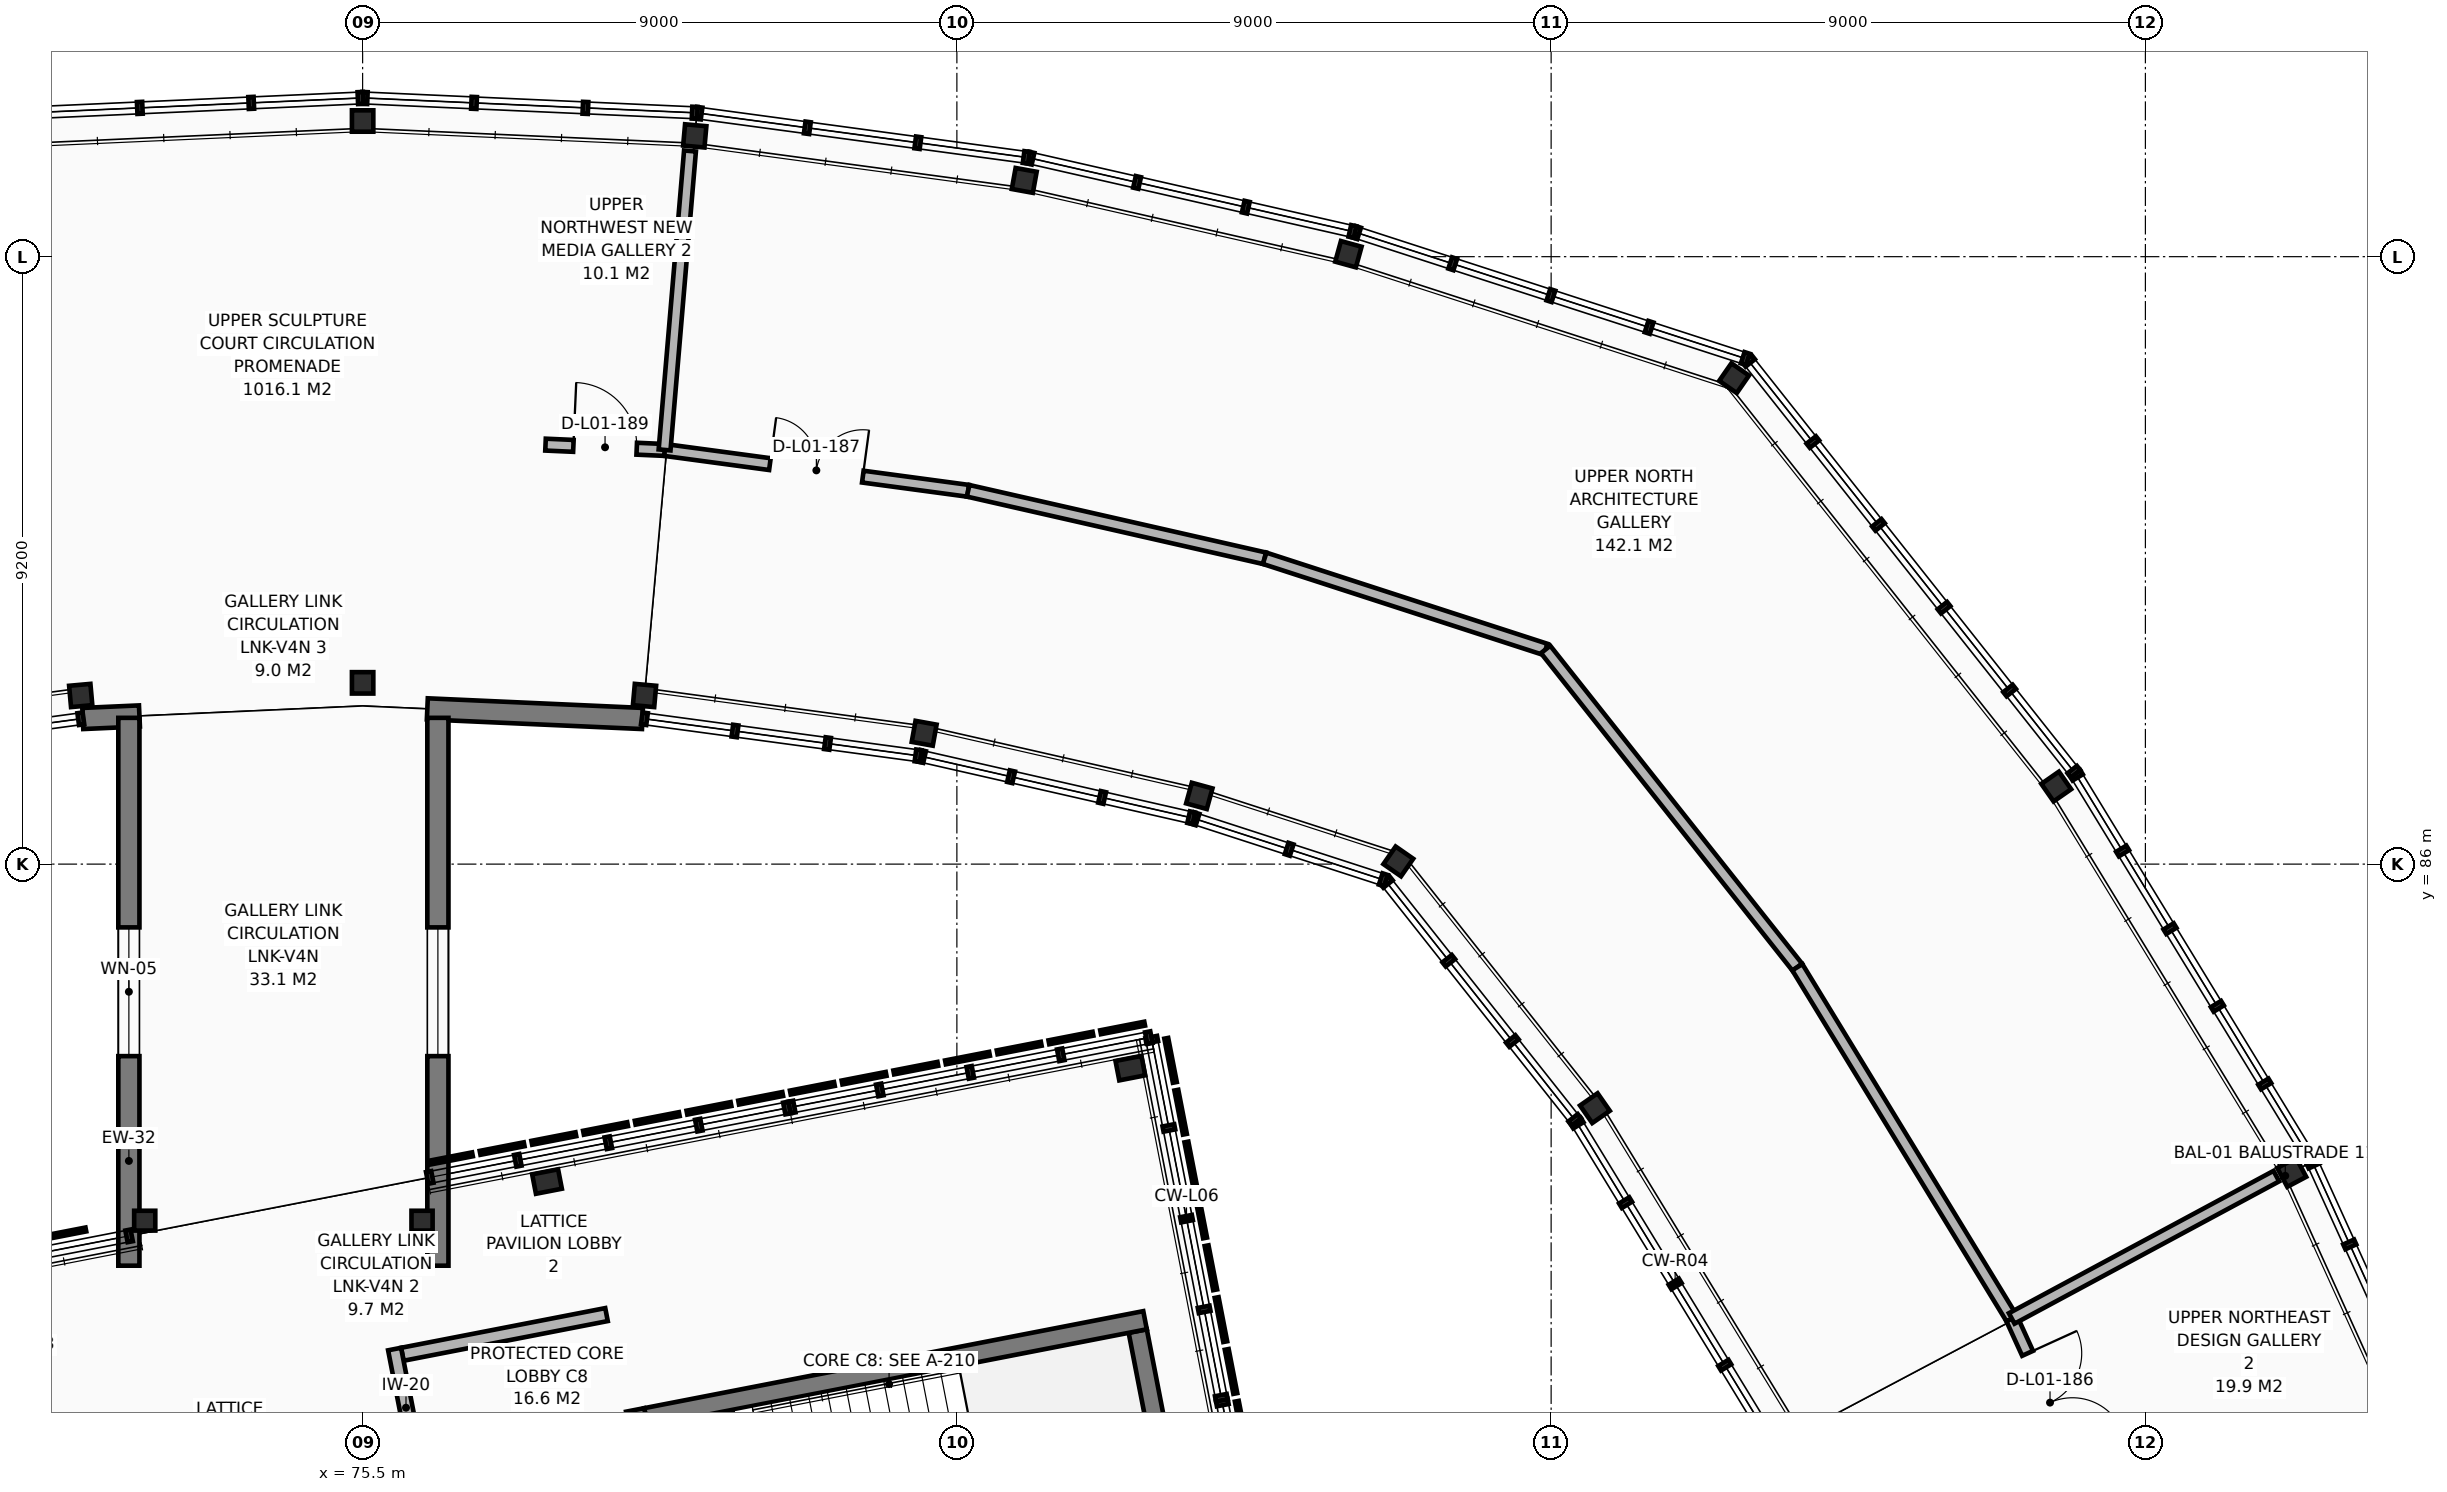
"""IFC4 building model, lengths in metres.
Left out: names, types, materials, properties, quantities, classifications, styles, units other than length and angle.
Written with IfcOpenShell. Run it as: python <this file> out.ifc"""

import sys

from ifc_helpers import new_model, si_unit, direction, frame, frame_2d, origin, origin_2d, place, context, subcontext, project, spatial, rectangle, hollow_circle, i_section, extrude, element, fill, save


model = new_model("IFC4")
c1 = context("Model", 3, precision=1e-05, world=origin(), true_north=direction((0.0, 1.0)))
c2 = subcontext(c1, "Body", "Model", "MODEL_VIEW")
j1 = project(units=[si_unit("LENGTHUNIT", "METRE"), si_unit("PLANEANGLEUNIT", "RADIAN")], contexts=[c1])
p1 = place(None, origin())
s1 = spatial("IfcSite", under=j1, at=p1, CompositionType="ELEMENT")
p2 = place(p1, origin())
s2 = spatial("IfcBuilding", under=s1, at=p2, CompositionType="ELEMENT")
p3 = place(p2, frame((0.0, 0.0, 5.1)))
s3 = spatial("IfcBuildingStorey", under=s2, at=p3, CompositionType="ELEMENT", Elevation=5.1)
for number, where, z_axis, x_axis in (
    (1, (104.716, 81.331, 0.0), (0.0, 0.0, 1.0), (-0.884, -0.468, 0.0)),
    (2, (101.15, 87.175, 0.0), (0.0, 0.0, 1.0), (-0.82, -0.572, 0.0)),
    (3, (94.163, 82.304, 0.0), (0.0, 0.0, 1.0), (-0.82, -0.572, 0.0)),
    (4, (96.271, 93.36, 0.0), (0.0, 0.0, 1.0), (-0.571, -0.821, 0.0)),
    (5, (91.186, 86.041, 0.0), (0.0, 0.0, 1.0), (-0.571, -0.821, 0.0)),
    (6, (90.43, 95.237, 0.0), (0.0, 0.0, 1.0), (-0.265, -0.964, 0.0)),
    (7, (88.171, 87.033, 0.0), (0.0, 0.0, 1.0), (-0.265, -0.964, 0.0)),
    (8, (85.52, 96.355, 0.0), (0.0, 0.0, 1.0), (-0.178, -0.984, 0.0)),
    (9, (84.004, 87.982, 0.0), (0.0, 0.0, 1.0), (-0.178, -0.984, 0.0)),
    (10, (80.53, 97.029, 0.0), (0.0, 0.0, 1.0), (-0.089, -0.996, 0.0)),
    (11, (79.769, 88.554, 0.0), (0.0, 0.0, 1.0), (-0.089, -0.996, 0.0)),
    (12, (75.5, 97.255, 0.0), (0.0, 0.0, 1.0), (0.0, -1.0, 0.0)),
    (13, (75.5, 88.745, 0.0), (0.0, 0.0, 1.0), (0.0, -1.0, 0.0)),
    (14, (71.231, 88.554, 0.0), (0.0, 0.0, 1.0), (0.089, -0.996, 0.0)),
):
    element("IfcColumn", number, at=place(p3, frame(where, z_axis=z_axis, x_axis=x_axis)), inside=s3, PredefinedType="COLUMN", context=c2, shape_type="SweptSolid", body=[
        extrude(hollow_circle(Radius=0.162, WallThickness=0.016, at=origin_2d()), origin(), (0.0, 0.0, 1.0), 4.42),
    ])
for number, where, z_axis, x_axis in (
    (15, (78.293, 81.193, 0.0), (0.0, 0.0, 1.0), (0.982, 0.191, 0.0)),
    (16, (87.127, 82.91, 0.0), (0.0, 0.0, 1.0), (0.982, 0.191, 0.0)),
):
    element("IfcColumn", number, at=place(p3, frame(where, z_axis=z_axis, x_axis=x_axis)), inside=s3, PredefinedType="COLUMN", context=c2, shape_type="SweptSolid", body=[
        extrude(i_section(OverallWidth=0.3, OverallDepth=0.4, WebThickness=0.013, FlangeThickness=0.024, FilletRadius=0.027, at=origin_2d()), origin(), (0.0, 0.0, 1.0), 4.42),
    ])
for number, where, z_axis, x_axis in (
    (17, (72.2, 80.6, 0.0), (0.0, 0.0, 1.0), (1.0, 0.0, 0.0)),
    (18, (76.4, 80.6, 0.0), (0.0, 0.0, 1.0), (1.0, 0.0, 0.0)),
):
    element("IfcColumn", number, at=place(p3, frame(where, z_axis=z_axis, x_axis=x_axis)), inside=s3, PredefinedType="COLUMN", context=c2, shape_type="SweptSolid", body=[
        extrude(i_section(OverallWidth=0.3, OverallDepth=0.32, WebThickness=0.011, FlangeThickness=0.021, FilletRadius=0.027, at=origin_2d()), origin(), (0.0, 0.0, 1.0), 4.42),
    ])
p4 = place(p3, frame((79.738, 88.206, 0.0), z_axis=(0.0, 0.0, 1.0), x_axis=(-0.998997506034, 0.044765868011, 0.0)))
e19 = element("IfcWall", 19, at=p4, inside=s3, PredefinedType="SOLIDWALL", context=c2, shape_type="SweptSolid", body=[
    extrude(rectangle(XDim=3.261, YDim=0.32, at=frame_2d((1.631, 0.0))), origin(), (0.0, 0.0, 1.0), 4.18),
])
p5 = place(p3, frame((72.12, 88.244, 0.0), z_axis=(0.0, 0.0, 1.0), x_axis=(-0.999003976874, -0.044621230262, 0.0)))
e20 = element("IfcWall", 20, at=p5, inside=s3, PredefinedType="SOLIDWALL", context=c2, shape_type="SweptSolid", body=[
    extrude(rectangle(XDim=0.859, YDim=0.32, at=frame_2d((0.43, 0.0))), origin(), (0.0, 0.0, 1.0), 4.18),
])
p6 = place(p3, frame((71.96, 79.918, 0.0), z_axis=(0.0, 0.0, 1.0), x_axis=(0.0, 1.0, 0.0)))
e21 = element("IfcWall", 21, at=p6, inside=s3, PredefinedType="SOLIDWALL", context=c2, shape_type="SweptSolid", body=[
    extrude(rectangle(XDim=8.297, YDim=0.32, at=frame_2d((4.149, 0.0))), origin(), (0.0, 0.0, 1.0), 4.18),
])
p7 = place(p6, frame((3.174, 0.0, 1.12)))
e22 = element("IfcOpeningElement", 22, at=p7, cuts=e21, PredefinedType="OPENING", context=c2, shape_type="SweptSolid", body=[
    extrude(rectangle(XDim=1.95, YDim=1.5, at=frame_2d((0.975, 0.75))), frame((0.0, 0.17, 0.0), z_axis=(0.0, -1.0, 0.0), x_axis=(1.0, 0.0, 0.0)), (0.0, 0.0, 1.0), 0.34),
])
p8 = place(p3, frame((76.64, 88.215, 0.0), z_axis=(0.0, 0.0, 1.0), x_axis=(0.0, -1.0, 0.0)))
e23 = element("IfcWall", 23, at=p8, inside=s3, PredefinedType="SOLIDWALL", context=c2, shape_type="SweptSolid", body=[
    extrude(rectangle(XDim=8.297, YDim=0.32, at=frame_2d((4.149, 0.0))), origin(), (0.0, 0.0, 1.0), 4.18),
])
p9 = place(p8, frame((3.174, 0.0, 1.12)))
e24 = element("IfcOpeningElement", 24, at=p9, cuts=e23, PredefinedType="OPENING", context=c2, shape_type="SweptSolid", body=[
    extrude(rectangle(XDim=1.95, YDim=1.5, at=frame_2d((0.975, 0.75))), frame((0.0, 0.17, 0.0), z_axis=(0.0, -1.0, 0.0), x_axis=(1.0, 0.0, 0.0)), (0.0, 0.0, 1.0), 0.34),
])
p10 = place(p3, frame((87.827, 75.905, 0.0), z_axis=(0.0, 0.0, 1.0), x_axis=(-0.190869659102, 0.981615389669, 0.0)))
e25 = element("IfcWall", 25, at=p10, inside=s3, PredefinedType="SHEAR", context=c2, shape_type="SweptSolid", body=[
    extrude(rectangle(XDim=3.08, YDim=0.28, at=frame_2d((1.54, 0.0))), origin(), (0.0, 0.0, 1.0), 4.2),
])
p11 = place(p3, frame((87.35, 79.092, 0.0), z_axis=(0.0, 0.0, 1.0), x_axis=(-0.98162132967, -0.190839107987, 0.0)))
e26 = element("IfcWall", 26, at=p11, inside=s3, PredefinedType="SHEAR", context=c2, shape_type="SweptSolid", body=[
    extrude(rectangle(XDim=7.7, YDim=0.28, at=frame_2d((3.85, 0.0))), origin(), (0.0, 0.0, 1.0), 4.2),
])
p12 = place(p3, frame((79.627, 77.734, 0.0), z_axis=(0.0, 0.0, 1.0), x_axis=(0.190812213529, -0.981626557897, 0.0)))
e27 = element("IfcWall", 27, at=p12, inside=s3, PredefinedType="SHEAR", context=c2, shape_type="SweptSolid", body=[
    extrude(rectangle(XDim=3.64, YDim=0.28, at=frame_2d((1.82, 0.0))), origin(), (0.0, 0.0, 1.0), 4.2),
])
p13 = place(p12, frame((1.2, 0.0, 0.0)))
e28 = element("IfcOpeningElement", 28, at=p13, cuts=e27, PredefinedType="OPENING", context=c2, shape_type="SweptSolid", body=[
    extrude(rectangle(XDim=1.32, YDim=2.12, at=frame_2d((0.66, 1.06))), frame((0.0, 0.15, 0.0), z_axis=(0.0, -1.0, 0.0), x_axis=(1.0, 0.0, 0.0)), (0.0, 0.0, 1.0), 0.3),
])
p14 = place(p3, frame((79.194, 79.177, 0.0), z_axis=(0.0, 0.0, 1.0), x_axis=(-0.981624666284, -0.190821944603, 0.0)))
e29 = element("IfcWall", 29, at=p14, inside=s3, PredefinedType="PARTITIONING", context=c2, shape_type="SweptSolid", body=[
    extrude(rectangle(XDim=3.15, YDim=0.2, at=frame_2d((1.575, 0.0))), origin(), (0.0, 0.0, 1.0), 3.79),
])
p15 = place(p3, frame((76.958, 73.649, 0.0), z_axis=(0.0, 0.0, 1.0), x_axis=(-0.190810719655, 0.98162684828, 0.0)))
e30 = element("IfcWall", 30, at=p15, inside=s3, PredefinedType="PARTITIONING", context=c2, shape_type="SweptSolid", body=[
    extrude(rectangle(XDim=5.1, YDim=0.2, at=frame_2d((2.55, 0.0))), origin(), (0.0, 0.0, 1.0), 3.85),
])
p16 = place(p15, frame((1.81, 0.0, 0.0)))
e31 = element("IfcOpeningElement", 31, at=p16, cuts=e30, PredefinedType="OPENING", context=c2, shape_type="SweptSolid", body=[
    extrude(rectangle(XDim=1.48, YDim=2.15, at=frame_2d((0.74, 1.075))), frame((0.0, 0.11, 0.0), z_axis=(0.0, -1.0, 0.0), x_axis=(1.0, 0.0, 0.0)), (0.0, 0.0, 1.0), 0.22),
])
p17 = place(p3, frame((100.475, 79.119, 0.0), z_axis=(0.0, 0.0, 1.0), x_axis=(0.414597499108, -0.910004897643, 0.0)))
e32 = element("IfcWall", 32, at=p17, inside=s3, PredefinedType="PARTITIONING", context=c2, shape_type="SweptSolid", body=[
    extrude(rectangle(XDim=2.801, YDim=0.18, at=frame_2d((1.4, 0.0))), origin(), (0.0, 0.0, 1.0), 3.57),
])
p18 = place(p17, frame((0.58, 0.0, 0.0)))
e33 = element("IfcOpeningElement", 33, at=p18, cuts=e32, PredefinedType="OPENING", context=c2, shape_type="SweptSolid", body=[
    extrude(rectangle(XDim=1.64, YDim=2.2, at=frame_2d((0.82, 1.1))), frame((0.0, 0.1, 0.0), z_axis=(0.0, -1.0, 0.0), x_axis=(1.0, 0.0, 0.0)), (0.0, 0.0, 1.0), 0.2),
])
p19 = place(p3, frame((80.073, 92.273, 0.0), z_axis=(0.0, 0.0, 1.0), x_axis=(0.991068153598, -0.133356345647, 0.0)))
e34 = element("IfcWall", 34, at=p19, inside=s3, PredefinedType="PARTITIONING", context=c2, shape_type="SweptSolid", body=[
    extrude(rectangle(XDim=4.639, YDim=0.18, at=frame_2d((2.32, 0.0))), origin(), (0.0, 0.0, 1.0), 3.57),
])
p20 = place(p19, frame((1.61, 0.0, 0.0)))
e35 = element("IfcOpeningElement", 35, at=p20, cuts=e34, PredefinedType="OPENING", context=c2, shape_type="SweptSolid", body=[
    extrude(rectangle(XDim=1.42, YDim=2.18, at=frame_2d((0.71, 1.09))), frame((0.0, 0.1, 0.0), z_axis=(0.0, -1.0, 0.0), x_axis=(1.0, 0.0, 0.0)), (0.0, 0.0, 1.0), 0.2),
])
p21 = place(p3, frame((84.671, 91.654, 0.0), z_axis=(0.0, 0.0, 1.0), x_axis=(0.975049979992, -0.221985442131, 0.0)))
e36 = element("IfcWall", 36, at=p21, inside=s3, PredefinedType="PARTITIONING", context=c2, shape_type="SweptSolid", body=[
    extrude(rectangle(XDim=4.605, YDim=0.18, at=frame_2d((2.302, 0.0))), origin(), (0.0, 0.0, 1.0), 3.57),
])
p22 = place(p3, frame((89.161, 90.632, 0.0), z_axis=(0.0, 0.0, 1.0), x_axis=(0.95121156526, -0.308539394755, 0.0)))
e37 = element("IfcWall", 37, at=p22, inside=s3, PredefinedType="PARTITIONING", context=c2, shape_type="SweptSolid", body=[
    extrude(rectangle(XDim=4.474, YDim=0.18, at=frame_2d((2.237, 0.0))), origin(), (0.0, 0.0, 1.0), 3.57),
])
p23 = place(p3, frame((93.416, 89.251, 0.0), z_axis=(0.0, 0.0, 1.0), x_axis=(0.620919863194, -0.783874048232, 0.0)))
e38 = element("IfcWall", 38, at=p23, inside=s3, PredefinedType="PARTITIONING", context=c2, shape_type="SweptSolid", body=[
    extrude(rectangle(XDim=6.14, YDim=0.18, at=frame_2d((3.07, 0.0))), origin(), (0.0, 0.0, 1.0), 3.57),
])
p24 = place(p3, frame((97.229, 84.439, 0.0), z_axis=(0.0, 0.0, 1.0), x_axis=(0.520915928932, -0.853607986716, 0.0)))
e39 = element("IfcWall", 39, at=p24, inside=s3, PredefinedType="PARTITIONING", context=c2, shape_type="SweptSolid", body=[
    extrude(rectangle(XDim=6.232, YDim=0.18, at=frame_2d((3.116, 0.0))), origin(), (0.0, 0.0, 1.0), 3.57),
])
p25 = place(p3, frame((78.27, 92.354, 0.0), z_axis=(0.0, 0.0, 1.0), x_axis=(0.99899706853, -0.044775630289, 0.0)))
e40 = element("IfcWall", 40, at=p25, inside=s3, PredefinedType="PARTITIONING", context=c2, shape_type="SweptSolid", body=[
    extrude(rectangle(XDim=1.805, YDim=0.18, at=frame_2d((0.902, 0.0))), origin(), (0.0, 0.0, 1.0), 3.57),
])
p26 = place(p25, frame((0.423, 0.0, 0.0)))
e41 = element("IfcOpeningElement", 41, at=p26, cuts=e40, PredefinedType="OPENING", context=c2, shape_type="SweptSolid", body=[
    extrude(rectangle(XDim=0.96, YDim=2.1, at=frame_2d((0.48, 1.05))), frame((0.0, 0.1, 0.0), z_axis=(0.0, -1.0, 0.0), x_axis=(1.0, 0.0, 0.0)), (0.0, 0.0, 1.0), 0.2),
])
p27 = place(p3, frame((71.651, 72.23, 0.0), z_axis=(0.0, 0.0, 1.0), x_axis=(-0.190786732806, 0.981631510591, 0.0)))
e42 = element("IfcWall", 42, at=p27, inside=s3, PredefinedType="PARTITIONING", context=c2, shape_type="SweptSolid", body=[
    extrude(rectangle(XDim=7.88, YDim=0.18, at=frame_2d((3.94, 0.0))), origin(), (0.0, 0.0, 1.0), 3.79),
])
p28 = place(p27, frame((3.23, 0.0, 0.0)))
e43 = element("IfcOpeningElement", 43, at=p28, cuts=e42, PredefinedType="OPENING", context=c2, shape_type="SweptSolid", body=[
    extrude(rectangle(XDim=1.42, YDim=2.18, at=frame_2d((0.71, 1.09))), frame((0.0, 0.1, 0.0), z_axis=(0.0, -1.0, 0.0), x_axis=(1.0, 0.0, 0.0)), (0.0, 0.0, 1.0), 0.2),
])
p29 = place(p3, frame((100.476, 79.119, 0.0), z_axis=(0.0, 0.0, 1.0), x_axis=(0.880691517808, 0.473690247379, 0.0)))
e44 = element("IfcWall", 44, at=p29, inside=s3, PredefinedType="PARTITIONING", context=c2, shape_type="SweptSolid", body=[
    extrude(rectangle(XDim=4.551, YDim=0.18, at=frame_2d((2.275, 0.0))), origin(), (0.0, 0.0, 1.0), 3.57),
])
p30 = place(p3, frame((80.073, 92.273, 0.0), z_axis=(0.0, 0.0, 1.0), x_axis=(0.084735134654, 0.996403511111, 0.0)))
e45 = element("IfcWall", 45, at=p30, inside=s3, PredefinedType="PARTITIONING", context=c2, shape_type="SweptSolid", body=[
    extrude(rectangle(XDim=4.544, YDim=0.18, at=frame_2d((2.272, 0.0))), origin(), (0.0, 0.0, 1.0), 3.57),
])
p31 = place(p7, origin())
e46 = element("IfcWindow", 46, at=p31, inside=s3, PartitioningType="SINGLE_PANEL", PredefinedType="WINDOW", context=c2, shape_type="SweptSolid", body=[
    extrude(rectangle(XDim=1.95, YDim=1.5, at=frame_2d((0.975, 0.75))), frame((0.0, 0.03, 0.0), z_axis=(0.0, -1.0, 0.0), x_axis=(1.0, 0.0, 0.0)), (0.0, 0.0, 1.0), 0.06),
])
fill(e22, e46)
p32 = place(p9, origin())
e47 = element("IfcWindow", 47, at=p32, inside=s3, PartitioningType="SINGLE_PANEL", PredefinedType="WINDOW", context=c2, shape_type="SweptSolid", body=[
    extrude(rectangle(XDim=1.95, YDim=1.5, at=frame_2d((0.975, 0.75))), frame((0.0, 0.03, 0.0), z_axis=(0.0, -1.0, 0.0), x_axis=(1.0, 0.0, 0.0)), (0.0, 0.0, 1.0), 0.06),
])
fill(e24, e47)
p33 = place(p18, origin())
e48 = element("IfcDoor", 48, at=p33, inside=s3, OperationType="DOUBLE_DOOR_SINGLE_SWING", PredefinedType="DOOR", context=c2, shape_type="SweptSolid", body=[
    extrude(rectangle(XDim=1.64, YDim=2.2, at=frame_2d((0.82, 1.1))), frame((0.0, 0.025, 0.0), z_axis=(0.0, -1.0, 0.0), x_axis=(1.0, 0.0, 0.0)), (0.0, 0.0, 1.0), 0.05),
])
fill(e33, e48)
p34 = place(p20, origin())
e49 = element("IfcDoor", 49, at=p34, inside=s3, OperationType="DOUBLE_DOOR_SINGLE_SWING", PredefinedType="DOOR", context=c2, shape_type="SweptSolid", body=[
    extrude(rectangle(XDim=1.42, YDim=2.18, at=frame_2d((0.71, 1.09))), frame((0.0, 0.025, 0.0), z_axis=(0.0, -1.0, 0.0), x_axis=(1.0, 0.0, 0.0)), (0.0, 0.0, 1.0), 0.05),
])
fill(e35, e49)
p35 = place(p26, origin())
e50 = element("IfcDoor", 50, at=p35, inside=s3, OperationType="SINGLE_SWING_LEFT", PredefinedType="DOOR", context=c2, shape_type="SweptSolid", body=[
    extrude(rectangle(XDim=0.96, YDim=2.1, at=frame_2d((0.48, 1.05))), frame((0.0, 0.025, 0.0), z_axis=(0.0, -1.0, 0.0), x_axis=(1.0, 0.0, 0.0)), (0.0, 0.0, 1.0), 0.05),
])
fill(e41, e50)
save(model, sys.argv[1])
